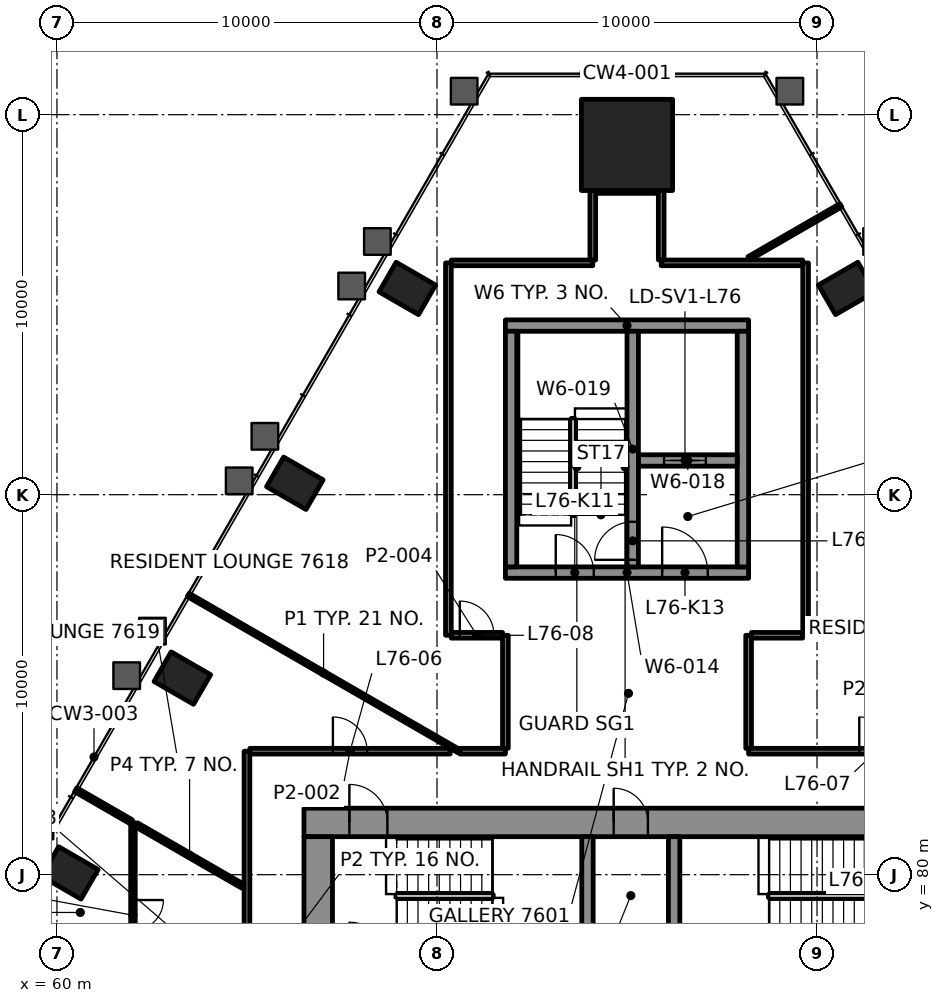
"""IFC4 building model, lengths in metres.
Left out: names, types, materials, properties, quantities, classifications, styles, units other than length and angle.
Written with IfcOpenShell. Run it as: python <this file> out.ifc"""

import sys

from ifc_helpers import new_model, si_unit, direction, frame, frame_2d, origin, origin_2d, place, context, subcontext, project, spatial, rectangle, hollow_rectangle, extrude, element, fill, save


model = new_model("IFC4")
c1 = context("Model", 3, precision=1e-05, world=origin(), true_north=direction((0.0, 1.0)))
c2 = subcontext(c1, "Body", "Model", "MODEL_VIEW")
j1 = project(units=[si_unit("LENGTHUNIT", "METRE"), si_unit("PLANEANGLEUNIT", "RADIAN")], contexts=[c1])
p1 = place(None, origin())
s1 = spatial("IfcSite", under=j1, at=p1, CompositionType="ELEMENT")
p2 = place(p1, origin())
s2 = spatial("IfcBuilding", under=s1, at=p2, CompositionType="ELEMENT")
p3 = place(p2, frame((0.0, 0.0, 312.6)))
s3 = spatial("IfcBuildingStorey", under=s2, at=p3, CompositionType="ELEMENT", Elevation=312.6)
p4 = place(p3, frame((75.0, 99.204, 0.0), z_axis=(0.0, 0.0, 1.0), x_axis=(-1.0, 0.0, 0.0)))
e1 = element("IfcColumn", 1, at=p4, inside=s3, PredefinedType="COLUMN", context=c2, shape_type="SweptSolid", body=[
    extrude(rectangle(XDim=2.4, YDim=2.4, at=origin_2d()), origin(), (0.0, 0.0, 1.0), 3.5),
])
for number, where, z_axis, x_axis in (
    (2, (80.781, 95.427, -0.0), (0.0, 0.0, 1.0), (-0.5, 0.866, 0.0)),
    (3, (69.219, 95.427, -0.0), (0.0, 0.0, 1.0), (-0.5, -0.866, 0.0)),
    (4, (66.26, 90.3, -0.0), (0.0, 0.0, 1.0), (-0.5, -0.866, 0.0)),
    (5, (63.299, 85.173, -0.0), (0.0, 0.0, 1.0), (-0.5, -0.866, 0.0)),
    (6, (60.339, 80.046, -0.0), (0.0, 0.0, 1.0), (-0.5, -0.866, 0.0)),
):
    element("IfcColumn", number, at=place(p3, frame(where, z_axis=z_axis, x_axis=x_axis)), inside=s3, PredefinedType="COLUMN", context=c2, shape_type="SweptSolid", body=[
        extrude(hollow_rectangle(XDim=0.9, YDim=1.2, WallThickness=0.06, at=origin_2d()), origin(), (0.0, 0.0, 1.0), 3.5),
    ])
p5 = place(p3, frame((66.5, 81.375, 0.0), z_axis=(0.0, 0.0, 1.0), x_axis=(1.0, 0.0, 0.0)))
e7 = element("IfcWall", 7, at=p5, inside=s3, PredefinedType="SHEAR", context=c2, shape_type="SweptSolid", body=[
    extrude(rectangle(XDim=17.0, YDim=0.75, at=frame_2d((8.5, 0.0))), origin(), (0.0, 0.0, 1.0), 3.3),
])
p6 = place(p5, frame((1.195, 0.0, 0.0)))
e8 = element("IfcOpeningElement", 8, at=p6, cuts=e7, PredefinedType="OPENING", context=c2, shape_type="SweptSolid", body=[
    extrude(rectangle(XDim=1.0, YDim=2.1, at=frame_2d((0.5, 1.05))), frame((0.0, 0.385, 0.0), z_axis=(0.0, -1.0, 0.0), x_axis=(1.0, 0.0, 0.0)), (0.0, 0.0, 1.0), 0.77),
])
p7 = place(p5, frame((15.005, 0.0, 0.0)))
e9 = element("IfcOpeningElement", 9, at=p7, cuts=e7, PredefinedType="OPENING", context=c2, shape_type="SweptSolid", body=[
    extrude(rectangle(XDim=1.0, YDim=2.1, at=frame_2d((0.5, 1.05))), frame((0.0, 0.385, 0.0), z_axis=(0.0, -1.0, 0.0), x_axis=(1.0, 0.0, 0.0)), (0.0, 0.0, 1.0), 0.77),
])
p8 = place(p5, frame((8.15, 0.0, 0.0)))
e10 = element("IfcOpeningElement", 10, at=p8, cuts=e7, PredefinedType="OPENING", context=c2, shape_type="SweptSolid", body=[
    extrude(rectangle(XDim=0.9, YDim=2.1, at=frame_2d((0.45, 1.05))), frame((0.0, 0.385, 0.0), z_axis=(0.0, -1.0, 0.0), x_axis=(1.0, 0.0, 0.0)), (0.0, 0.0, 1.0), 0.77),
])
p9 = place(p3, frame((66.875, 69.0, 0.0), z_axis=(0.0, 0.0, 1.0), x_axis=(0.0, 1.0, 0.0)))
e11 = element("IfcWall", 11, at=p9, inside=s3, PredefinedType="SHEAR", context=c2, shape_type="SweptSolid", body=[
    extrude(rectangle(XDim=12.0, YDim=0.75, at=frame_2d((6.0, 0.0))), origin(), (0.0, 0.0, 1.0), 3.3),
])
p10 = place(p9, frame((3.7, 0.0, 0.0)))
e12 = element("IfcOpeningElement", 12, at=p10, cuts=e11, PredefinedType="OPENING", context=c2, shape_type="SweptSolid", body=[
    extrude(rectangle(XDim=1.2, YDim=2.1, at=frame_2d((0.6, 1.05))), frame((0.0, 0.385, 0.0), z_axis=(0.0, -1.0, 0.0), x_axis=(1.0, 0.0, 0.0)), (0.0, 0.0, 1.0), 0.77),
])
for number, where, z_axis, x_axis in (
    (13, (73.96, 77.9, 0.0), (0.0, 0.0, 1.0), (0.0, 1.0, 0.0)),
    (14, (76.24, 77.9, 0.0), (0.0, 0.0, 1.0), (0.0, 1.0, 0.0)),
):
    element("IfcWall", number, at=place(p3, frame(where, z_axis=z_axis, x_axis=x_axis)), inside=s3, PredefinedType="SHEAR", context=c2, shape_type="SweptSolid", body=[
        extrude(rectangle(XDim=3.1, YDim=0.3, at=frame_2d((1.55, 0.0))), origin(), (0.0, 0.0, 1.0), 3.3),
    ])
p11 = place(p3, frame((71.8, 87.95, 0.0), z_axis=(0.0, 0.0, 1.0), x_axis=(1.0, 0.0, 0.0)))
e15 = element("IfcWall", 15, at=p11, inside=s3, PredefinedType="SHEAR", context=c2, shape_type="SweptSolid", body=[
    extrude(rectangle(XDim=6.4, YDim=0.3, at=frame_2d((3.2, 0.0))), origin(), (0.0, 0.0, 1.0), 3.3),
])
p12 = place(p11, frame((1.325, 0.0, 0.0)))
e16 = element("IfcOpeningElement", 16, at=p12, cuts=e15, PredefinedType="OPENING", context=c2, shape_type="SweptSolid", body=[
    extrude(rectangle(XDim=1.0, YDim=2.1, at=frame_2d((0.5, 1.05))), frame((0.0, 0.16, 0.0), z_axis=(0.0, -1.0, 0.0), x_axis=(1.0, 0.0, 0.0)), (0.0, 0.0, 1.0), 0.32),
])
p13 = place(p11, frame((4.125, 0.0, 0.0)))
e17 = element("IfcOpeningElement", 17, at=p13, cuts=e15, PredefinedType="OPENING", context=c2, shape_type="SweptSolid", body=[
    extrude(rectangle(XDim=1.2, YDim=2.1, at=frame_2d((0.6, 1.05))), frame((0.0, 0.16, 0.0), z_axis=(0.0, -1.0, 0.0), x_axis=(1.0, 0.0, 0.0)), (0.0, 0.0, 1.0), 0.32),
])
p14 = place(p3, frame((71.8, 94.45, 0.0), z_axis=(0.0, 0.0, 1.0), x_axis=(1.0, 0.0, 0.0)))
e18 = element("IfcWall", 18, at=p14, inside=s3, PredefinedType="SHEAR", context=c2, shape_type="SweptSolid", body=[
    extrude(rectangle(XDim=6.4, YDim=0.3, at=frame_2d((3.2, 0.0))), origin(), (0.0, 0.0, 1.0), 3.3),
])
for number, where, z_axis, x_axis in (
    (19, (71.95, 88.1, 0.0), (0.0, 0.0, 1.0), (0.0, 1.0, 0.0)),
    (20, (78.05, 88.1, 0.0), (0.0, 0.0, 1.0), (0.0, 1.0, 0.0)),
):
    element("IfcWall", number, at=place(p3, frame(where, z_axis=z_axis, x_axis=x_axis)), inside=s3, PredefinedType="SHEAR", context=c2, shape_type="SweptSolid", body=[
        extrude(rectangle(XDim=6.2, YDim=0.3, at=frame_2d((3.1, 0.0))), origin(), (0.0, 0.0, 1.0), 3.3),
    ])
p15 = place(p3, frame((75.3, 90.9, 0.0), z_axis=(0.0, 0.0, 1.0), x_axis=(1.0, 0.0, 0.0)))
e21 = element("IfcWall", 21, at=p15, inside=s3, PredefinedType="SHEAR", context=c2, shape_type="SweptSolid", body=[
    extrude(rectangle(XDim=2.6, YDim=0.3, at=frame_2d((1.3, 0.0))), origin(), (0.0, 0.0, 1.0), 3.3),
])
p16 = place(p15, frame((0.675, 0.0, 0.0)))
e22 = element("IfcOpeningElement", 22, at=p16, cuts=e21, PredefinedType="OPENING", context=c2, shape_type="SweptSolid", body=[
    extrude(rectangle(XDim=1.1, YDim=2.1, at=frame_2d((0.55, 1.05))), frame((0.0, 0.16, 0.0), z_axis=(0.0, -1.0, 0.0), x_axis=(1.0, 0.0, 0.0)), (0.0, 0.0, 1.0), 0.32),
])
p17 = place(p3, frame((75.15, 88.1, 0.0), z_axis=(0.0, 0.0, 1.0), x_axis=(0.0, 1.0, 0.0)))
e23 = element("IfcWall", 23, at=p17, inside=s3, PredefinedType="SHEAR", context=c2, shape_type="SweptSolid", body=[
    extrude(rectangle(XDim=6.2, YDim=0.3, at=frame_2d((3.1, 0.0))), origin(), (0.0, 0.0, 1.0), 3.3),
])
p18 = place(p17, frame((0.185, 0.0, 0.0)))
e24 = element("IfcOpeningElement", 24, at=p18, cuts=e23, PredefinedType="OPENING", context=c2, shape_type="SweptSolid", body=[
    extrude(rectangle(XDim=1.0, YDim=2.1, at=frame_2d((0.5, 1.05))), frame((0.0, 0.16, 0.0), z_axis=(0.0, -1.0, 0.0), x_axis=(1.0, 0.0, 0.0)), (0.0, 0.0, 1.0), 0.32),
])
p19 = place(p3, frame((65.075, 83.25, 0.0), z_axis=(0.0, 0.0, 1.0), x_axis=(1.0, 0.0, 0.0)))
e25 = element("IfcWall", 25, at=p19, inside=s3, PredefinedType="PARTITIONING", context=c2, shape_type="SweptSolid", body=[
    extrude(rectangle(XDim=5.271, YDim=0.15, at=frame_2d((2.636, 0.0))), origin(), (0.0, 0.0, 1.0), 2.7),
])
p20 = place(p19, frame((2.186, 0.0, 0.0)))
e26 = element("IfcOpeningElement", 26, at=p20, cuts=e25, PredefinedType="OPENING", context=c2, shape_type="SweptSolid", body=[
    extrude(rectangle(XDim=0.9, YDim=2.1, at=frame_2d((0.45, 1.05))), frame((0.0, 0.085, 0.0), z_axis=(0.0, -1.0, 0.0), x_axis=(1.0, 0.0, 0.0)), (0.0, 0.0, 1.0), 0.17),
])
p21 = place(p3, frame((78.2, 83.25, 0.0), z_axis=(0.0, 0.0, 1.0), x_axis=(1.0, 0.0, 0.0)))
e27 = element("IfcWall", 27, at=p21, inside=s3, PredefinedType="PARTITIONING", context=c2, shape_type="SweptSolid", body=[
    extrude(rectangle(XDim=6.723, YDim=0.15, at=frame_2d((3.362, 0.0))), origin(), (0.0, 0.0, 1.0), 2.7),
])
p22 = place(p21, frame((2.911, 0.0, 0.0)))
e28 = element("IfcOpeningElement", 28, at=p22, cuts=e27, PredefinedType="OPENING", context=c2, shape_type="SweptSolid", body=[
    extrude(rectangle(XDim=0.9, YDim=2.1, at=frame_2d((0.45, 1.05))), frame((0.0, 0.085, 0.0), z_axis=(0.0, -1.0, 0.0), x_axis=(1.0, 0.0, 0.0)), (0.0, 0.0, 1.0), 0.17),
])
p23 = place(p3, frame((70.375, 86.3, 0.0), z_axis=(0.0, 0.0, 1.0), x_axis=(1.0, 0.0, 0.0)))
e29 = element("IfcWall", 29, at=p23, inside=s3, PredefinedType="PARTITIONING", context=c2, shape_type="SweptSolid", body=[
    extrude(rectangle(XDim=1.349, YDim=0.15, at=frame_2d((0.675, 0.0))), origin(), (0.0, 0.0, 1.0), 2.7),
])
p24 = place(p23, frame((0.225, 0.0, 0.0)))
e30 = element("IfcOpeningElement", 30, at=p24, cuts=e29, PredefinedType="OPENING", context=c2, shape_type="SweptSolid", body=[
    extrude(rectangle(XDim=0.9, YDim=2.1, at=frame_2d((0.45, 1.05))), frame((0.0, 0.085, 0.0), z_axis=(0.0, -1.0, 0.0), x_axis=(1.0, 0.0, 0.0)), (0.0, 0.0, 1.0), 0.17),
])
p25 = place(p3, frame((78.275, 86.3, 0.0), z_axis=(0.0, 0.0, 1.0), x_axis=(1.0, 0.0, 0.0)))
e31 = element("IfcWall", 31, at=p25, inside=s3, PredefinedType="PARTITIONING", context=c2, shape_type="SweptSolid", body=[
    extrude(rectangle(XDim=1.348, YDim=0.15, at=frame_2d((0.674, 0.0))), origin(), (0.0, 0.0, 1.0), 2.7),
])
p26 = place(p3, frame((70.375, 96.1, 0.0), z_axis=(0.0, 0.0, 1.0), x_axis=(1.0, 0.0, 0.0)))
e32 = element("IfcWall", 32, at=p26, inside=s3, PredefinedType="PARTITIONING", context=c2, shape_type="SweptSolid", body=[
    extrude(rectangle(XDim=3.725, YDim=0.15, at=frame_2d((1.862, 0.0))), origin(), (0.0, 0.0, 1.0), 2.7),
])
p27 = place(p3, frame((75.9, 96.1, 0.0), z_axis=(0.0, 0.0, 1.0), x_axis=(1.0, 0.0, 0.0)))
e33 = element("IfcWall", 33, at=p27, inside=s3, PredefinedType="PARTITIONING", context=c2, shape_type="SweptSolid", body=[
    extrude(rectangle(XDim=3.723, YDim=0.15, at=frame_2d((1.862, 0.0))), origin(), (0.0, 0.0, 1.0), 2.7),
])
p28 = place(p3, frame((74.176, 98.004, 0.0), z_axis=(0.0, 0.0, 1.0), x_axis=(1.0, 0.0, 0.0)))
e34 = element("IfcWall", 34, at=p28, inside=s3, PredefinedType="PARTITIONING", context=c2, shape_type="SweptSolid", body=[
    extrude(rectangle(XDim=1.649, YDim=0.15, at=frame_2d((0.824, 0.0))), origin(), (0.0, 0.0, 1.0), 2.697),
])
p29 = place(p3, frame((78.208, 96.22, 0.0), z_axis=(0.0, 0.0, 1.0), x_axis=(0.866028321769, 0.499994945868, 0.0)))
e35 = element("IfcWall", 35, at=p29, inside=s3, PredefinedType="PARTITIONING", context=c2, shape_type="SweptSolid", body=[
    extrude(rectangle(XDim=2.792, YDim=0.1, at=frame_2d((1.396, 0.0))), origin(), (0.0, 0.0, 1.0), 2.7),
])
p30 = place(p3, frame((79.7, 86.302, 0.0), z_axis=(0.0, 0.0, 1.0), x_axis=(0.0, 1.0, 0.0)))
e36 = element("IfcWall", 36, at=p30, inside=s3, PredefinedType="PARTITIONING", context=c2, shape_type="SweptSolid", body=[
    extrude(rectangle(XDim=9.796, YDim=0.15, at=frame_2d((4.898, 0.0))), origin(), (0.0, 0.0, 1.0), 2.7),
])
p31 = place(p3, frame((78.2, 83.325, 0.0), z_axis=(0.0, 0.0, 1.0), x_axis=(0.0, 1.0, 0.0)))
e37 = element("IfcWall", 37, at=p31, inside=s3, PredefinedType="PARTITIONING", context=c2, shape_type="SweptSolid", body=[
    extrude(rectangle(XDim=2.975, YDim=0.15, at=frame_2d((1.488, 0.0))), origin(), (0.0, 0.0, 1.0), 2.7),
])
for number, where, z_axis, x_axis in (
    (38, (75.9, 96.175, 0.0), (0.0, 0.0, 1.0), (0.0, 1.0, 0.0)),
    (39, (74.1, 96.175, 0.0), (0.0, 0.0, 1.0), (0.0, 1.0, 0.0)),
):
    element("IfcWall", number, at=place(p3, frame(where, z_axis=z_axis, x_axis=x_axis)), inside=s3, PredefinedType="PARTITIONING", context=c2, shape_type="SweptSolid", body=[
        extrude(rectangle(XDim=1.828, YDim=0.15, at=frame_2d((0.914, 0.0))), origin(), (0.0, 0.0, 1.0), 2.7),
    ])
p32 = place(p3, frame((71.8, 83.325, 0.0), z_axis=(0.0, 0.0, 1.0), x_axis=(0.0, 1.0, 0.0)))
e40 = element("IfcWall", 40, at=p32, inside=s3, PredefinedType="PARTITIONING", context=c2, shape_type="SweptSolid", body=[
    extrude(rectangle(XDim=2.975, YDim=0.15, at=frame_2d((1.488, 0.0))), origin(), (0.0, 0.0, 1.0), 2.7),
])
p33 = place(p3, frame((70.3, 86.301, 0.0), z_axis=(0.0, 0.0, 1.0), x_axis=(0.0, 1.0, 0.0)))
e41 = element("IfcWall", 41, at=p33, inside=s3, PredefinedType="PARTITIONING", context=c2, shape_type="SweptSolid", body=[
    extrude(rectangle(XDim=9.799, YDim=0.15, at=frame_2d((4.899, 0.0))), origin(), (0.0, 0.0, 1.0), 2.7),
])
p34 = place(p3, frame((65.0, 70.266, 0.0), z_axis=(0.0, 0.0, 1.0), x_axis=(0.0, 1.0, 0.0)))
e42 = element("IfcWall", 42, at=p34, inside=s3, PredefinedType="PARTITIONING", context=c2, shape_type="SweptSolid", body=[
    extrude(rectangle(XDim=12.984, YDim=0.15, at=frame_2d((6.492, 0.0))), origin(), (0.0, 0.0, 1.0), 2.7),
])
p35 = place(p3, frame((62.0, 81.366, 0.0), z_axis=(0.0, 0.0, 1.0), x_axis=(0.0, -1.0, 0.0)))
e43 = element("IfcWall", 43, at=p35, inside=s3, PredefinedType="PARTITIONING", context=c2, shape_type="SweptSolid", body=[
    extrude(rectangle(XDim=9.299, YDim=0.12, at=frame_2d((4.649, 0.0))), origin(), (0.0, 0.0, 1.0), 2.7),
])
p36 = place(p35, frame((2.033, 0.0, 0.0)))
e44 = element("IfcOpeningElement", 44, at=p36, cuts=e43, PredefinedType="OPENING", context=c2, shape_type="SweptSolid", body=[
    extrude(rectangle(XDim=0.8, YDim=2.1, at=frame_2d((0.4, 1.05))), frame((0.0, 0.07, 0.0), z_axis=(0.0, -1.0, 0.0), x_axis=(1.0, 0.0, 0.0)), (0.0, 0.0, 1.0), 0.14),
])
p37 = place(p35, frame((6.8, 0.0, 0.0)))
e45 = element("IfcOpeningElement", 45, at=p37, cuts=e43, PredefinedType="OPENING", context=c2, shape_type="SweptSolid", body=[
    extrude(rectangle(XDim=0.9, YDim=2.1, at=frame_2d((0.45, 1.05))), frame((0.0, 0.07, 0.0), z_axis=(0.0, -1.0, 0.0), x_axis=(1.0, 0.0, 0.0)), (0.0, 0.0, 1.0), 0.14),
])
p38 = place(p3, frame((70.577, 83.25, 0.0), z_axis=(0.0, 0.0, 1.0), x_axis=(-0.866020477552, 0.500008532388, 0.0)))
e46 = element("IfcWall", 46, at=p38, inside=s3, PredefinedType="PARTITIONING", context=c2, shape_type="SweptSolid", body=[
    extrude(rectangle(XDim=8.224, YDim=0.1, at=frame_2d((4.112, 0.0))), origin(), (0.0, 0.0, 1.0), 2.688),
])
p39 = place(p3, frame((64.89, 79.697, 0.0), z_axis=(0.0, 0.0, 1.0), x_axis=(-0.866013313631, 0.500020940175, 0.0)))
e47 = element("IfcWall", 47, at=p39, inside=s3, PredefinedType="PARTITIONING", context=c2, shape_type="SweptSolid", body=[
    extrude(rectangle(XDim=3.233, YDim=0.12, at=frame_2d((1.617, 0.0))), origin(), (0.0, 0.0, 1.0), 2.7),
])
p40 = place(p3, frame((58.447, 78.689, 0.0), z_axis=(0.0, 0.0, 1.0), x_axis=(0.866035275801, -0.499982900776, 0.0)))
e48 = element("IfcWall", 48, at=p40, inside=s3, PredefinedType="PARTITIONING", context=c2, shape_type="SweptSolid", body=[
    extrude(rectangle(XDim=4.003, YDim=0.1, at=frame_2d((2.001, 0.0))), origin(), (0.0, 0.0, 1.0), 2.688),
])
p41 = place(p40, frame((1.732, 0.0, 0.0)))
e49 = element("IfcOpeningElement", 49, at=p41, cuts=e48, PredefinedType="OPENING", context=c2, shape_type="SweptSolid", body=[
    extrude(rectangle(XDim=0.9, YDim=2.1, at=frame_2d((0.45, 1.05))), frame((0.0, 0.06, 0.0), z_axis=(0.0, -1.0, 0.0), x_axis=(1.0, 0.0, 0.0)), (0.0, 0.0, 1.0), 0.12),
])
p42 = place(p3, frame((70.602, 83.25, 0.0), z_axis=(0.0, 0.0, 1.0), x_axis=(1.0, 0.0, 0.0)))
e50 = element("IfcWall", 50, at=p42, inside=s3, PredefinedType="PARTITIONING", context=c2, shape_type="SweptSolid", body=[
    extrude(rectangle(XDim=1.198, YDim=0.15, at=frame_2d((0.599, 0.0))), origin(), (0.0, 0.0, 1.0), 2.7),
])
p43 = place(p3, frame((61.955, 81.392, 0.0), z_axis=(0.0, 0.0, 1.0), x_axis=(-0.866033677446, 0.499985669323, 0.0)))
e51 = element("IfcWall", 51, at=p43, inside=s3, PredefinedType="PARTITIONING", context=c2, shape_type="SweptSolid", body=[
    extrude(rectangle(XDim=1.686, YDim=0.12, at=frame_2d((0.843, 0.0))), origin(), (0.0, 0.0, 1.0), 2.688),
])
p44 = place(p20, origin())
e52 = element("IfcDoor", 52, at=p44, inside=s3, OperationType="SINGLE_SWING_RIGHT", PredefinedType="DOOR", context=c2, shape_type="SweptSolid", body=[
    extrude(rectangle(XDim=0.9, YDim=2.1, at=frame_2d((0.45, 1.05))), frame((0.0, 0.025, 0.0), z_axis=(0.0, -1.0, 0.0), x_axis=(1.0, 0.0, 0.0)), (0.0, 0.0, 1.0), 0.05),
])
fill(e26, e52)
p45 = place(p22, origin())
e53 = element("IfcDoor", 53, at=p45, inside=s3, OperationType="SINGLE_SWING_RIGHT", PredefinedType="DOOR", context=c2, shape_type="SweptSolid", body=[
    extrude(rectangle(XDim=0.9, YDim=2.1, at=frame_2d((0.45, 1.05))), frame((0.0, 0.025, 0.0), z_axis=(0.0, -1.0, 0.0), x_axis=(1.0, 0.0, 0.0)), (0.0, 0.0, 1.0), 0.05),
])
fill(e28, e53)
p46 = place(p24, origin())
e54 = element("IfcDoor", 54, at=p46, inside=s3, OperationType="SINGLE_SWING_LEFT", PredefinedType="DOOR", context=c2, shape_type="SweptSolid", body=[
    extrude(rectangle(XDim=0.9, YDim=2.1, at=frame_2d((0.45, 1.05))), frame((0.0, 0.025, 0.0), z_axis=(0.0, -1.0, 0.0), x_axis=(1.0, 0.0, 0.0)), (0.0, 0.0, 1.0), 0.05),
])
fill(e30, e54)
p47 = place(p36, origin())
e55 = element("IfcDoor", 55, at=p47, inside=s3, OperationType="SINGLE_SWING_RIGHT", PredefinedType="DOOR", context=c2, shape_type="SweptSolid", body=[
    extrude(rectangle(XDim=0.8, YDim=2.1, at=frame_2d((0.4, 1.05))), frame((0.0, 0.025, 0.0), z_axis=(0.0, -1.0, 0.0), x_axis=(1.0, 0.0, 0.0)), (0.0, 0.0, 1.0), 0.05),
])
fill(e44, e55)
p48 = place(p16, origin())
e56 = element("IfcDoor", 56, at=p48, inside=s3, OperationType="DOUBLE_DOOR_SLIDING", PredefinedType="DOOR", context=c2, shape_type="SweptSolid", body=[
    extrude(rectangle(XDim=1.1, YDim=2.1, at=frame_2d((0.55, 1.05))), frame((0.0, 0.025, 0.0), z_axis=(0.0, -1.0, 0.0), x_axis=(1.0, 0.0, 0.0)), (0.0, 0.0, 1.0), 0.05),
])
fill(e22, e56)
p49 = place(p6, origin())
e57 = element("IfcDoor", 57, at=p49, inside=s3, OperationType="SINGLE_SWING_RIGHT", PredefinedType="DOOR", context=c2, shape_type="SweptSolid", body=[
    extrude(rectangle(XDim=1.0, YDim=2.1, at=frame_2d((0.5, 1.05))), frame((0.0, 0.095, 0.0), z_axis=(0.0, -1.0, 0.0), x_axis=(1.0, 0.0, 0.0)), (0.0, 0.0, 1.0), 0.19),
])
fill(e8, e57)
p50 = place(p12, origin())
e58 = element("IfcDoor", 58, at=p50, inside=s3, OperationType="SINGLE_SWING_RIGHT", PredefinedType="DOOR", context=c2, shape_type="SweptSolid", body=[
    extrude(rectangle(XDim=1.0, YDim=2.1, at=frame_2d((0.5, 1.05))), frame((0.0, 0.025, 0.0), z_axis=(0.0, -1.0, 0.0), x_axis=(1.0, 0.0, 0.0)), (0.0, 0.0, 1.0), 0.05),
])
fill(e16, e58)
p51 = place(p18, origin())
e59 = element("IfcDoor", 59, at=p51, inside=s3, OperationType="SINGLE_SWING_LEFT", PredefinedType="DOOR", context=c2, shape_type="SweptSolid", body=[
    extrude(rectangle(XDim=1.0, YDim=2.1, at=frame_2d((0.5, 1.05))), frame((0.0, 0.025, 0.0), z_axis=(0.0, -1.0, 0.0), x_axis=(1.0, 0.0, 0.0)), (0.0, 0.0, 1.0), 0.05),
])
fill(e24, e59)
p52 = place(p13, origin())
e60 = element("IfcDoor", 60, at=p52, inside=s3, OperationType="SINGLE_SWING_RIGHT", PredefinedType="DOOR", context=c2, shape_type="SweptSolid", body=[
    extrude(rectangle(XDim=1.2, YDim=2.1, at=frame_2d((0.6, 1.05))), frame((0.0, 0.025, 0.0), z_axis=(0.0, -1.0, 0.0), x_axis=(1.0, 0.0, 0.0)), (0.0, 0.0, 1.0), 0.05),
])
fill(e17, e60)
p53 = place(p8, origin())
e61 = element("IfcDoor", 61, at=p53, inside=s3, OperationType="SINGLE_SWING_RIGHT", PredefinedType="DOOR", context=c2, shape_type="SweptSolid", body=[
    extrude(rectangle(XDim=0.9, YDim=2.1, at=frame_2d((0.45, 1.05))), frame((0.0, 0.095, 0.0), z_axis=(0.0, -1.0, 0.0), x_axis=(1.0, 0.0, 0.0)), (0.0, 0.0, 1.0), 0.19),
])
fill(e10, e61)
save(model, sys.argv[1])
